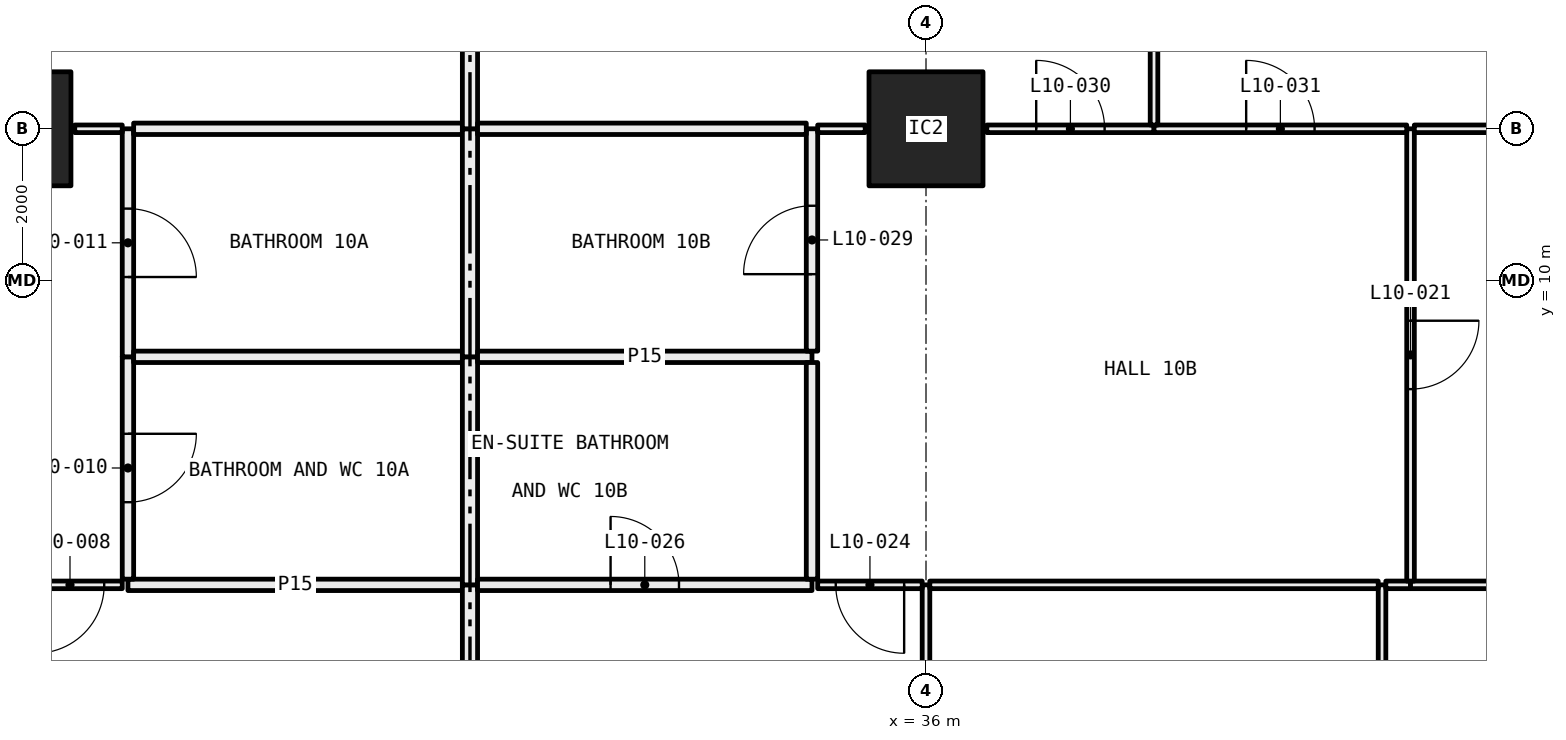
"""IFC4 building model, lengths in metres.
Left out: names, types, materials, properties, quantities, classifications, styles, units other than length and angle.
Written with IfcOpenShell. Run it as: python <this file> out.ifc"""

import sys

from ifc_helpers import new_model, si_unit, direction, frame, frame_2d, origin, origin_2d, place, context, subcontext, project, spatial, rectangle, hollow_rectangle, extrude, element, fill, save


model = new_model("IFC4")
c1 = context("Model", 3, precision=1e-05, world=origin(), true_north=direction((0.0, 1.0)))
c2 = subcontext(c1, "Body", "Model", "MODEL_VIEW")
j1 = project(units=[si_unit("LENGTHUNIT", "METRE"), si_unit("PLANEANGLEUNIT", "RADIAN")], contexts=[c1])
p1 = place(None, origin())
s1 = spatial("IfcSite", under=j1, at=p1, CompositionType="ELEMENT")
p2 = place(p1, origin())
s2 = spatial("IfcBuilding", under=s1, at=p2, CompositionType="ELEMENT")
p3 = place(p2, frame((0.0, 0.0, 47.25)))
s3 = spatial("IfcBuildingStorey", under=s2, at=p3, CompositionType="ELEMENT", Elevation=47.25)
for number, where, z_axis, x_axis in (
    (1, (24.0, 12.0, 0.0), (0.0, 0.0, 1.0), (1.0, 0.0, 0.0)),
    (2, (36.0, 12.0, 0.0), (0.0, 0.0, 1.0), (1.0, 0.0, 0.0)),
):
    element("IfcColumn", number, at=place(p3, frame(where, z_axis=z_axis, x_axis=x_axis)), inside=s3, PredefinedType="COLUMN", context=c2, shape_type="SweptSolid", body=[
        extrude(hollow_rectangle(XDim=1.5, YDim=1.5, WallThickness=0.065, at=origin_2d()), origin(), (0.0, 0.0, 1.0), 3.05),
    ])
p4 = place(p3, frame((25.425, 6.0, 0.0), z_axis=(0.0, 0.0, 1.0), x_axis=(-1.0, 0.0, 0.0)))
e3 = element("IfcWall", 3, at=p4, inside=s3, PredefinedType="PARTITIONING", context=c2, shape_type="SweptSolid", body=[
    extrude(rectangle(XDim=1.375, YDim=0.1, at=frame_2d((0.688, 0.0))), origin(), (0.0, 0.0, 1.0), 2.45),
])
p5 = place(p4, frame((0.238, 0.0, 0.0)))
e4 = element("IfcOpeningElement", 4, at=p5, cuts=e3, PredefinedType="OPENING", context=c2, shape_type="SweptSolid", body=[
    extrude(rectangle(XDim=0.9, YDim=2.1, at=frame_2d((0.45, 1.05))), frame((0.0, 0.06, 0.0), z_axis=(0.0, -1.0, 0.0), x_axis=(1.0, 0.0, 0.0)), (0.0, 0.0, 1.0), 0.12),
])
p6 = place(p3, frame((29.9, 6.0, 0.0), z_axis=(0.0, 0.0, 1.0), x_axis=(-1.0, 0.0, 0.0)))
e5 = element("IfcWall", 5, at=p6, inside=s3, PredefinedType="PARTITIONING", context=c2, shape_type="SweptSolid", body=[
    extrude(rectangle(XDim=4.4, YDim=0.15, at=frame_2d((2.2, 0.0))), origin(), (0.0, 0.0, 1.0), 3.05),
])
p7 = place(p3, frame((30.0, 0.72, 0.0), z_axis=(0.0, 0.0, 1.0), x_axis=(0.0, 1.0, 0.0)))
e6 = element("IfcWall", 6, at=p7, inside=s3, PredefinedType="PARTITIONING", context=c2, shape_type="SweptSolid", body=[
    extrude(rectangle(XDim=5.28, YDim=0.2, at=frame_2d((2.64, 0.0))), origin(), (0.0, 0.0, 1.0), 3.05),
])
p8 = place(p3, frame((25.5, 6.075, 0.0), z_axis=(0.0, 0.0, 1.0), x_axis=(0.0, 1.0, 0.0)))
e7 = element("IfcWall", 7, at=p8, inside=s3, PredefinedType="PARTITIONING", context=c2, shape_type="SweptSolid", body=[
    extrude(rectangle(XDim=2.925, YDim=0.15, at=frame_2d((1.462, 0.0))), origin(), (0.0, 0.0, 1.0), 3.05),
])
p9 = place(p8, frame((1.012, 0.0, 0.0)))
e8 = element("IfcOpeningElement", 8, at=p9, cuts=e7, PredefinedType="OPENING", context=c2, shape_type="SweptSolid", body=[
    extrude(rectangle(XDim=0.9, YDim=2.1, at=frame_2d((0.45, 1.05))), frame((0.0, 0.085, 0.0), z_axis=(0.0, -1.0, 0.0), x_axis=(1.0, 0.0, 0.0)), (0.0, 0.0, 1.0), 0.17),
])
p10 = place(p3, frame((25.5, 9.0, 0.0), z_axis=(0.0, 0.0, 1.0), x_axis=(0.0, 1.0, 0.0)))
e9 = element("IfcWall", 9, at=p10, inside=s3, PredefinedType="PARTITIONING", context=c2, shape_type="SweptSolid", body=[
    extrude(rectangle(XDim=3.0, YDim=0.15, at=frame_2d((1.5, 0.0))), origin(), (0.0, 0.0, 1.0), 2.45),
])
p11 = place(p10, frame((1.05, 0.0, 0.0)))
e10 = element("IfcOpeningElement", 10, at=p11, cuts=e9, PredefinedType="OPENING", context=c2, shape_type="SweptSolid", body=[
    extrude(rectangle(XDim=0.9, YDim=2.1, at=frame_2d((0.45, 1.05))), frame((0.0, 0.085, 0.0), z_axis=(0.0, -1.0, 0.0), x_axis=(1.0, 0.0, 0.0)), (0.0, 0.0, 1.0), 0.17),
])
p12 = place(p3, frame((25.425, 12.0, 0.0), z_axis=(0.0, 0.0, 1.0), x_axis=(-1.0, 0.0, 0.0)))
e11 = element("IfcWall", 11, at=p12, inside=s3, PredefinedType="PARTITIONING", context=c2, shape_type="SweptSolid", body=[
    extrude(rectangle(XDim=0.625, YDim=0.1, at=frame_2d((0.312, 0.0))), origin(), (0.0, 0.0, 1.0), 2.45),
])
p13 = place(p3, frame((29.9, 9.0, 0.0), z_axis=(0.0, 0.0, 1.0), x_axis=(-1.0, 0.0, 0.0)))
e12 = element("IfcWall", 12, at=p13, inside=s3, PredefinedType="PARTITIONING", context=c2, shape_type="SweptSolid", body=[
    extrude(rectangle(XDim=4.325, YDim=0.15, at=frame_2d((2.163, 0.0))), origin(), (0.0, 0.0, 1.0), 3.05),
])
p14 = place(p3, frame((30.0, 6.0, 0.0), z_axis=(0.0, 0.0, 1.0), x_axis=(0.0, 1.0, 0.0)))
e13 = element("IfcWall", 13, at=p14, inside=s3, PredefinedType="PARTITIONING", context=c2, shape_type="SweptSolid", body=[
    extrude(rectangle(XDim=3.0, YDim=0.2, at=frame_2d((1.5, 0.0))), origin(), (0.0, 0.0, 1.0), 3.05),
])
p15 = place(p3, frame((29.9, 12.0, 0.0), z_axis=(0.0, 0.0, 1.0), x_axis=(-1.0, 0.0, 0.0)))
e14 = element("IfcWall", 14, at=p15, inside=s3, PredefinedType="PARTITIONING", context=c2, shape_type="SweptSolid", body=[
    extrude(rectangle(XDim=4.325, YDim=0.15, at=frame_2d((2.163, 0.0))), origin(), (0.0, 0.0, 1.0), 2.45),
])
p16 = place(p3, frame((30.0, 9.0, 0.0), z_axis=(0.0, 0.0, 1.0), x_axis=(0.0, 1.0, 0.0)))
e15 = element("IfcWall", 15, at=p16, inside=s3, PredefinedType="PARTITIONING", context=c2, shape_type="SweptSolid", body=[
    extrude(rectangle(XDim=3.0, YDim=0.2, at=frame_2d((1.5, 0.0))), origin(), (0.0, 0.0, 1.0), 2.45),
])
p17 = place(p3, frame((30.0, 12.0, 0.0), z_axis=(0.0, 0.0, 1.0), x_axis=(0.0, 1.0, 0.0)))
e16 = element("IfcWall", 16, at=p17, inside=s3, PredefinedType="PARTITIONING", context=c2, shape_type="SweptSolid", body=[
    extrude(rectangle(XDim=6.0, YDim=0.2, at=frame_2d((3.0, 0.0))), origin(), (0.0, 0.0, 1.0), 2.45),
])
p18 = place(p3, frame((36.0, 0.72, 0.0), z_axis=(0.0, 0.0, 1.0), x_axis=(0.0, 1.0, 0.0)))
e17 = element("IfcWall", 17, at=p18, inside=s3, PredefinedType="PARTITIONING", context=c2, shape_type="SweptSolid", body=[
    extrude(rectangle(XDim=5.28, YDim=0.1, at=frame_2d((2.64, 0.0))), origin(), (0.0, 0.0, 1.0), 2.45),
])
p19 = place(p3, frame((34.5, 6.0, 0.0), z_axis=(0.0, 0.0, 1.0), x_axis=(-1.0, 0.0, 0.0)))
e18 = element("IfcWall", 18, at=p19, inside=s3, PredefinedType="PARTITIONING", context=c2, shape_type="SweptSolid", body=[
    extrude(rectangle(XDim=4.4, YDim=0.15, at=frame_2d((2.2, 0.0))), origin(), (0.0, 0.0, 1.0), 3.05),
])
p20 = place(p19, frame((1.75, 0.0, 0.0)))
e19 = element("IfcOpeningElement", 19, at=p20, cuts=e18, PredefinedType="OPENING", context=c2, shape_type="SweptSolid", body=[
    extrude(rectangle(XDim=0.9, YDim=2.1, at=frame_2d((0.45, 1.05))), frame((0.0, 0.085, 0.0), z_axis=(0.0, -1.0, 0.0), x_axis=(1.0, 0.0, 0.0)), (0.0, 0.0, 1.0), 0.17),
])
p21 = place(p3, frame((35.95, 6.0, 0.0), z_axis=(0.0, 0.0, 1.0), x_axis=(-1.0, 0.0, 0.0)))
e20 = element("IfcWall", 20, at=p21, inside=s3, PredefinedType="PARTITIONING", context=c2, shape_type="SweptSolid", body=[
    extrude(rectangle(XDim=1.375, YDim=0.1, at=frame_2d((0.688, 0.0))), origin(), (0.0, 0.0, 1.0), 2.45),
])
p22 = place(p21, frame((0.238, 0.0, 0.0)))
e21 = element("IfcOpeningElement", 21, at=p22, cuts=e20, PredefinedType="OPENING", context=c2, shape_type="SweptSolid", body=[
    extrude(rectangle(XDim=0.9, YDim=2.1, at=frame_2d((0.45, 1.05))), frame((0.0, 0.06, 0.0), z_axis=(0.0, -1.0, 0.0), x_axis=(1.0, 0.0, 0.0)), (0.0, 0.0, 1.0), 0.12),
])
p23 = place(p3, frame((42.0, 0.72, 0.0), z_axis=(0.0, 0.0, 1.0), x_axis=(0.0, 1.0, 0.0)))
e22 = element("IfcWall", 22, at=p23, inside=s3, PredefinedType="PARTITIONING", context=c2, shape_type="SweptSolid", body=[
    extrude(rectangle(XDim=5.28, YDim=0.1, at=frame_2d((2.64, 0.0))), origin(), (0.0, 0.0, 1.0), 3.05),
])
p24 = place(p23, frame((2.19, 0.0, 0.0)))
e23 = element("IfcOpeningElement", 23, at=p24, cuts=e22, PredefinedType="OPENING", context=c2, shape_type="SweptSolid", body=[
    extrude(rectangle(XDim=0.9, YDim=2.1, at=frame_2d((0.45, 1.05))), frame((0.0, 0.06, 0.0), z_axis=(0.0, -1.0, 0.0), x_axis=(1.0, 0.0, 0.0)), (0.0, 0.0, 1.0), 0.12),
])
p25 = place(p3, frame((41.95, 6.0, 0.0), z_axis=(0.0, 0.0, 1.0), x_axis=(-1.0, 0.0, 0.0)))
e24 = element("IfcWall", 24, at=p25, inside=s3, PredefinedType="PARTITIONING", context=c2, shape_type="SweptSolid", body=[
    extrude(rectangle(XDim=5.9, YDim=0.1, at=frame_2d((2.95, 0.0))), origin(), (0.0, 0.0, 1.0), 2.45),
])
p26 = place(p3, frame((42.375, 6.0, 0.0), z_axis=(0.0, 0.0, 1.0), x_axis=(-1.0, 0.0, 0.0)))
e25 = element("IfcWall", 25, at=p26, inside=s3, PredefinedType="PARTITIONING", context=c2, shape_type="SweptSolid", body=[
    extrude(rectangle(XDim=0.325, YDim=0.1, at=frame_2d((0.163, 0.0))), origin(), (0.0, 0.0, 1.0), 3.05),
])
p27 = place(p3, frame((47.9, 6.0, 0.0), z_axis=(0.0, 0.0, 1.0), x_axis=(-1.0, 0.0, 0.0)))
e26 = element("IfcWall", 26, at=p27, inside=s3, PredefinedType="PARTITIONING", context=c2, shape_type="SweptSolid", body=[
    extrude(rectangle(XDim=5.525, YDim=0.1, at=frame_2d((2.762, 0.0))), origin(), (0.0, 0.0, 1.0), 3.05),
])
p28 = place(p27, frame((2.312, 0.0, 0.0)))
e27 = element("IfcOpeningElement", 27, at=p28, cuts=e26, PredefinedType="OPENING", context=c2, shape_type="SweptSolid", body=[
    extrude(rectangle(XDim=0.9, YDim=2.1, at=frame_2d((0.45, 1.05))), frame((0.0, 0.06, 0.0), z_axis=(0.0, -1.0, 0.0), x_axis=(1.0, 0.0, 0.0)), (0.0, 0.0, 1.0), 0.12),
])
p29 = place(p3, frame((34.5, 9.0, 0.0), z_axis=(0.0, 0.0, 1.0), x_axis=(-1.0, 0.0, 0.0)))
e28 = element("IfcWall", 28, at=p29, inside=s3, PredefinedType="PARTITIONING", context=c2, shape_type="SweptSolid", body=[
    extrude(rectangle(XDim=4.4, YDim=0.15, at=frame_2d((2.2, 0.0))), origin(), (0.0, 0.0, 1.0), 3.05),
])
p30 = place(p3, frame((34.5, 6.075, 0.0), z_axis=(0.0, 0.0, 1.0), x_axis=(0.0, 1.0, 0.0)))
e29 = element("IfcWall", 29, at=p30, inside=s3, PredefinedType="PARTITIONING", context=c2, shape_type="SweptSolid", body=[
    extrude(rectangle(XDim=2.85, YDim=0.15, at=frame_2d((1.425, 0.0))), origin(), (0.0, 0.0, 1.0), 3.05),
])
p31 = place(p3, frame((34.5, 9.075, 0.0), z_axis=(0.0, 0.0, 1.0), x_axis=(0.0, 1.0, 0.0)))
e30 = element("IfcWall", 30, at=p31, inside=s3, PredefinedType="PARTITIONING", context=c2, shape_type="SweptSolid", body=[
    extrude(rectangle(XDim=2.925, YDim=0.15, at=frame_2d((1.462, 0.0))), origin(), (0.0, 0.0, 1.0), 2.45),
])
p32 = place(p31, frame((1.012, 0.0, 0.0)))
e31 = element("IfcOpeningElement", 31, at=p32, cuts=e30, PredefinedType="OPENING", context=c2, shape_type="SweptSolid", body=[
    extrude(rectangle(XDim=0.9, YDim=2.1, at=frame_2d((0.45, 1.05))), frame((0.0, 0.085, 0.0), z_axis=(0.0, -1.0, 0.0), x_axis=(1.0, 0.0, 0.0)), (0.0, 0.0, 1.0), 0.17),
])
p33 = place(p3, frame((34.425, 12.0, 0.0), z_axis=(0.0, 0.0, 1.0), x_axis=(-1.0, 0.0, 0.0)))
e32 = element("IfcWall", 32, at=p33, inside=s3, PredefinedType="PARTITIONING", context=c2, shape_type="SweptSolid", body=[
    extrude(rectangle(XDim=4.325, YDim=0.15, at=frame_2d((2.163, 0.0))), origin(), (0.0, 0.0, 1.0), 2.45),
])
p34 = place(p3, frame((42.375, 6.05, 0.0), z_axis=(0.0, 0.0, 1.0), x_axis=(0.0, 1.0, 0.0)))
e33 = element("IfcWall", 33, at=p34, inside=s3, PredefinedType="PARTITIONING", context=c2, shape_type="SweptSolid", body=[
    extrude(rectangle(XDim=5.95, YDim=0.1, at=frame_2d((2.975, 0.0))), origin(), (0.0, 0.0, 1.0), 2.45),
])
p35 = place(p34, frame((2.525, 0.0, 0.0)))
e34 = element("IfcOpeningElement", 34, at=p35, cuts=e33, PredefinedType="OPENING", context=c2, shape_type="SweptSolid", body=[
    extrude(rectangle(XDim=0.9, YDim=2.1, at=frame_2d((0.45, 1.05))), frame((0.0, 0.06, 0.0), z_axis=(0.0, -1.0, 0.0), x_axis=(1.0, 0.0, 0.0)), (0.0, 0.0, 1.0), 0.12),
])
p36 = place(p3, frame((35.2, 12.0, 0.0), z_axis=(0.0, 0.0, 1.0), x_axis=(-1.0, 0.0, 0.0)))
e35 = element("IfcWall", 35, at=p36, inside=s3, PredefinedType="PARTITIONING", context=c2, shape_type="SweptSolid", body=[
    extrude(rectangle(XDim=0.625, YDim=0.1, at=frame_2d((0.312, 0.0))), origin(), (0.0, 0.0, 1.0), 2.45),
])
p37 = place(p3, frame((39.0, 12.0, 0.0), z_axis=(0.0, 0.0, 1.0), x_axis=(-1.0, 0.0, 0.0)))
e36 = element("IfcWall", 36, at=p37, inside=s3, PredefinedType="PARTITIONING", context=c2, shape_type="SweptSolid", body=[
    extrude(rectangle(XDim=2.2, YDim=0.1, at=frame_2d((1.1, 0.0))), origin(), (0.0, 0.0, 1.0), 2.45),
])
p38 = place(p37, frame((0.65, 0.0, 0.0)))
e37 = element("IfcOpeningElement", 37, at=p38, cuts=e36, PredefinedType="OPENING", context=c2, shape_type="SweptSolid", body=[
    extrude(rectangle(XDim=0.9, YDim=2.1, at=frame_2d((0.45, 1.05))), frame((0.0, 0.06, 0.0), z_axis=(0.0, -1.0, 0.0), x_axis=(1.0, 0.0, 0.0)), (0.0, 0.0, 1.0), 0.12),
])
p39 = place(p3, frame((42.325, 12.0, 0.0), z_axis=(0.0, 0.0, 1.0), x_axis=(-1.0, 0.0, 0.0)))
e38 = element("IfcWall", 38, at=p39, inside=s3, PredefinedType="PARTITIONING", context=c2, shape_type="SweptSolid", body=[
    extrude(rectangle(XDim=3.325, YDim=0.1, at=frame_2d((1.663, 0.0))), origin(), (0.0, 0.0, 1.0), 2.45),
])
p40 = place(p39, frame((1.212, 0.0, 0.0)))
e39 = element("IfcOpeningElement", 39, at=p40, cuts=e38, PredefinedType="OPENING", context=c2, shape_type="SweptSolid", body=[
    extrude(rectangle(XDim=0.9, YDim=2.1, at=frame_2d((0.45, 1.05))), frame((0.0, 0.06, 0.0), z_axis=(0.0, -1.0, 0.0), x_axis=(1.0, 0.0, 0.0)), (0.0, 0.0, 1.0), 0.12),
])
p41 = place(p3, frame((43.5, 12.0, 0.0), z_axis=(0.0, 0.0, 1.0), x_axis=(-1.0, 0.0, 0.0)))
e40 = element("IfcWall", 40, at=p41, inside=s3, PredefinedType="PARTITIONING", context=c2, shape_type="SweptSolid", body=[
    extrude(rectangle(XDim=1.075, YDim=0.1, at=frame_2d((0.538, 0.0))), origin(), (0.0, 0.0, 1.0), 2.45),
])
p42 = place(p3, frame((39.0, 12.05, 0.0), z_axis=(0.0, 0.0, 1.0), x_axis=(0.0, 1.0, 0.0)))
e41 = element("IfcWall", 41, at=p42, inside=s3, PredefinedType="PARTITIONING", context=c2, shape_type="SweptSolid", body=[
    extrude(rectangle(XDim=5.85, YDim=0.1, at=frame_2d((2.925, 0.0))), origin(), (0.0, 0.0, 1.0), 2.45),
])
p43 = place(p5, origin())
e42 = element("IfcDoor", 42, at=p43, inside=s3, OperationType="SINGLE_SWING_LEFT", PredefinedType="DOOR", context=c2, shape_type="SweptSolid", body=[
    extrude(rectangle(XDim=0.9, YDim=2.1, at=frame_2d((0.45, 1.05))), frame((0.0, 0.025, 0.0), z_axis=(0.0, -1.0, 0.0), x_axis=(1.0, 0.0, 0.0)), (0.0, 0.0, 1.0), 0.05),
])
fill(e4, e42)
p44 = place(p9, frame((0.9, 0.0, 0.0), x_axis=(-1.0, 0.0, 0.0)))
e43 = element("IfcDoor", 43, at=p44, inside=s3, OperationType="SINGLE_SWING_RIGHT", PredefinedType="DOOR", context=c2, shape_type="SweptSolid", body=[
    extrude(rectangle(XDim=0.9, YDim=2.1, at=frame_2d((0.45, 1.05))), frame((0.0, 0.025, 0.0), z_axis=(0.0, -1.0, 0.0), x_axis=(1.0, 0.0, 0.0)), (0.0, 0.0, 1.0), 0.05),
])
fill(e8, e43)
p45 = place(p11, frame((0.9, 0.0, 0.0), x_axis=(-1.0, 0.0, 0.0)))
e44 = element("IfcDoor", 44, at=p45, inside=s3, OperationType="SINGLE_SWING_LEFT", PredefinedType="DOOR", context=c2, shape_type="SweptSolid", body=[
    extrude(rectangle(XDim=0.9, YDim=2.1, at=frame_2d((0.45, 1.05))), frame((0.0, 0.025, 0.0), z_axis=(0.0, -1.0, 0.0), x_axis=(1.0, 0.0, 0.0)), (0.0, 0.0, 1.0), 0.05),
])
fill(e10, e44)
p46 = place(p35, frame((0.9, 0.0, 0.0), x_axis=(-1.0, 0.0, 0.0)))
e45 = element("IfcDoor", 45, at=p46, inside=s3, OperationType="SINGLE_SWING_RIGHT", PredefinedType="DOOR", context=c2, shape_type="SweptSolid", body=[
    extrude(rectangle(XDim=0.9, YDim=2.1, at=frame_2d((0.45, 1.05))), frame((0.0, 0.025, 0.0), z_axis=(0.0, -1.0, 0.0), x_axis=(1.0, 0.0, 0.0)), (0.0, 0.0, 1.0), 0.05),
])
fill(e34, e45)
p47 = place(p22, origin())
e46 = element("IfcDoor", 46, at=p47, inside=s3, OperationType="SINGLE_SWING_RIGHT", PredefinedType="DOOR", context=c2, shape_type="SweptSolid", body=[
    extrude(rectangle(XDim=0.9, YDim=2.1, at=frame_2d((0.45, 1.05))), frame((0.0, 0.025, 0.0), z_axis=(0.0, -1.0, 0.0), x_axis=(1.0, 0.0, 0.0)), (0.0, 0.0, 1.0), 0.05),
])
fill(e21, e46)
p48 = place(p20, frame((0.9, 0.0, 0.0), x_axis=(-1.0, 0.0, 0.0)))
e47 = element("IfcDoor", 47, at=p48, inside=s3, OperationType="SINGLE_SWING_RIGHT", PredefinedType="DOOR", context=c2, shape_type="SweptSolid", body=[
    extrude(rectangle(XDim=0.9, YDim=2.1, at=frame_2d((0.45, 1.05))), frame((0.0, 0.025, 0.0), z_axis=(0.0, -1.0, 0.0), x_axis=(1.0, 0.0, 0.0)), (0.0, 0.0, 1.0), 0.05),
])
fill(e19, e47)
p49 = place(p32, origin())
e48 = element("IfcDoor", 48, at=p49, inside=s3, OperationType="SINGLE_SWING_RIGHT", PredefinedType="DOOR", context=c2, shape_type="SweptSolid", body=[
    extrude(rectangle(XDim=0.9, YDim=2.1, at=frame_2d((0.45, 1.05))), frame((0.0, 0.025, 0.0), z_axis=(0.0, -1.0, 0.0), x_axis=(1.0, 0.0, 0.0)), (0.0, 0.0, 1.0), 0.05),
])
fill(e31, e48)
p50 = place(p38, frame((0.9, 0.0, 0.0), x_axis=(-1.0, 0.0, 0.0)))
e49 = element("IfcDoor", 49, at=p50, inside=s3, OperationType="SINGLE_SWING_RIGHT", PredefinedType="DOOR", context=c2, shape_type="SweptSolid", body=[
    extrude(rectangle(XDim=0.9, YDim=2.1, at=frame_2d((0.45, 1.05))), frame((0.0, 0.025, 0.0), z_axis=(0.0, -1.0, 0.0), x_axis=(1.0, 0.0, 0.0)), (0.0, 0.0, 1.0), 0.05),
])
fill(e37, e49)
p51 = place(p40, frame((0.9, 0.0, 0.0), x_axis=(-1.0, 0.0, 0.0)))
e50 = element("IfcDoor", 50, at=p51, inside=s3, OperationType="SINGLE_SWING_RIGHT", PredefinedType="DOOR", context=c2, shape_type="SweptSolid", body=[
    extrude(rectangle(XDim=0.9, YDim=2.1, at=frame_2d((0.45, 1.05))), frame((0.0, 0.025, 0.0), z_axis=(0.0, -1.0, 0.0), x_axis=(1.0, 0.0, 0.0)), (0.0, 0.0, 1.0), 0.05),
])
fill(e39, e50)
save(model, sys.argv[1])
